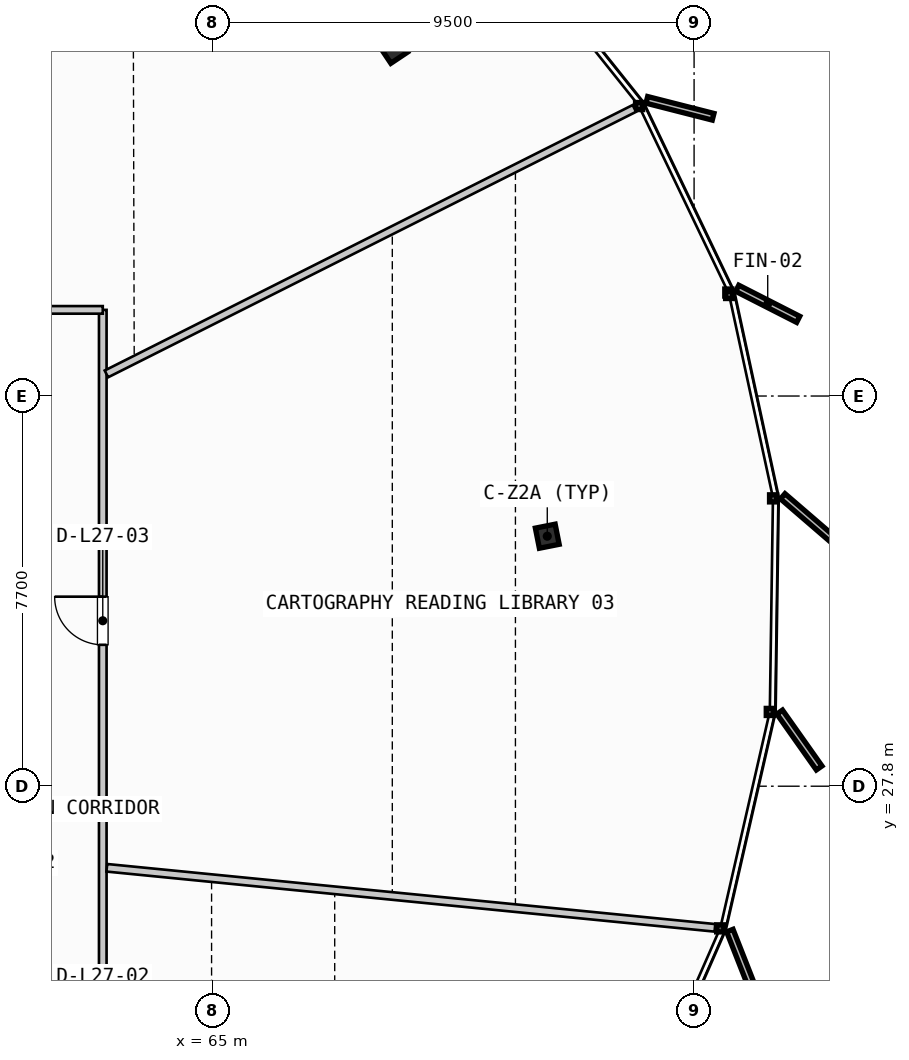
"""IFC4 building model, lengths in metres.
Left out: names, types, materials, properties, quantities, classifications, styles, units other than length and angle.
Written with IfcOpenShell. Run it as: python <this file> out.ifc"""

import sys

from ifc_helpers import new_model, si_unit, direction, frame, frame_2d, origin, origin_2d, place, context, subcontext, project, spatial, rectangle, i_section, extrude, source, transform, mapped, element, fill, save


model = new_model("IFC4")
c1 = context("Model", 3, precision=1e-05, world=origin(), true_north=direction((0.0, 1.0)))
c2 = subcontext(c1, "Body", "Model", "MODEL_VIEW")
j1 = project(units=[si_unit("LENGTHUNIT", "METRE"), si_unit("PLANEANGLEUNIT", "RADIAN")], contexts=[c1])
p1 = place(None, origin())
s1 = spatial("IfcSite", under=j1, at=p1, CompositionType="ELEMENT")
p2 = place(p1, origin())
s2 = spatial("IfcBuilding", under=s1, at=p2, CompositionType="ELEMENT")
p3 = place(p2, frame((0.0, 0.0, 110.8)))
s3 = spatial("IfcBuildingStorey", under=s2, at=p3, CompositionType="ELEMENT", Elevation=110.8)
m1 = source(origin(), c2, "Body", "SweptSolid", [
    extrude(i_section(OverallWidth=0.405, OverallDepth=0.398, WebThickness=0.035, FlangeThickness=0.056, FilletRadius=0.015, at=origin_2d()), origin(), (0.0, 0.0, 1.0), 3.35),
])
for number, where, z_axis, x_axis in (
    (1, (71.603, 32.733, 0.0), (0.0, 0.0, 1.0), (0.981, 0.195, 0.0)),
    (2, (68.569, 42.345, 0.0), (0.0, 0.0, 1.0), (0.831, 0.556, 0.0)),
):
    element("IfcColumn", number, at=place(p3, frame(where, z_axis=z_axis, x_axis=x_axis)), inside=s3, PredefinedType="COLUMN", context=c2, shape_type="MappedRepresentation", body=[
        mapped(m1, transform((0.0, 0.0, 0.0), scale=1.0)),
    ])
p4 = place(p3, frame((62.83, 17.98, 0.0), z_axis=(0.0, 0.0, 1.0), x_axis=(0.0, 1.0, 0.0)))
e3 = element("IfcWall", 3, at=p4, inside=s3, PredefinedType="PARTITIONING", context=c2, shape_type="SweptSolid", body=[
    extrude(rectangle(XDim=19.22, YDim=0.15, at=frame_2d((9.61, 0.0))), origin(), (0.0, 0.0, 1.0), 2.28),
])
p5 = place(p4, frame((3.924, 0.0, 0.0)))
e4 = element("IfcOpeningElement", 4, at=p5, cuts=e3, PredefinedType="OPENING", context=c2, shape_type="SweptSolid", body=[
    extrude(rectangle(XDim=0.95, YDim=2.15, at=frame_2d((0.475, 1.075))), frame((0.0, 0.085, 0.0), z_axis=(0.0, -1.0, 0.0), x_axis=(1.0, 0.0, 0.0)), (0.0, 0.0, 1.0), 0.17),
])
p6 = place(p4, frame((12.61, 0.0, 0.0)))
e5 = element("IfcOpeningElement", 5, at=p6, cuts=e3, PredefinedType="OPENING", context=c2, shape_type="SweptSolid", body=[
    extrude(rectangle(XDim=0.95, YDim=2.15, at=frame_2d((0.475, 1.075))), frame((0.0, 0.085, 0.0), z_axis=(0.0, -1.0, 0.0), x_axis=(1.0, 0.0, 0.0)), (0.0, 0.0, 1.0), 0.17),
])
p7 = place(p3, frame((62.83, 37.2, 0.0), z_axis=(0.0, 0.0, 1.0), x_axis=(-1.0, 0.0, 0.0)))
e6 = element("IfcWall", 6, at=p7, inside=s3, PredefinedType="PARTITIONING", context=c2, shape_type="SweptSolid", body=[
    extrude(rectangle(XDim=30.5, YDim=0.15, at=frame_2d((15.25, 0.0))), origin(), (0.0, 0.0, 1.0), 2.28),
])
p8 = place(p7, frame((5.396, 0.0, 0.0)))
e7 = element("IfcOpeningElement", 7, at=p8, cuts=e6, PredefinedType="OPENING", context=c2, shape_type="SweptSolid", body=[
    extrude(rectangle(XDim=0.95, YDim=2.15, at=frame_2d((0.475, 1.075))), frame((0.0, 0.085, 0.0), z_axis=(0.0, -1.0, 0.0), x_axis=(1.0, 0.0, 0.0)), (0.0, 0.0, 1.0), 0.17),
])
p9 = place(p7, frame((20.049, 0.0, 0.0)))
e8 = element("IfcOpeningElement", 8, at=p9, cuts=e6, PredefinedType="OPENING", context=c2, shape_type="SweptSolid", body=[
    extrude(rectangle(XDim=0.95, YDim=2.15, at=frame_2d((0.475, 1.075))), frame((0.0, 0.085, 0.0), z_axis=(0.0, -1.0, 0.0), x_axis=(1.0, 0.0, 0.0)), (0.0, 0.0, 1.0), 0.17),
])
p10 = place(p3, frame((62.91, 26.19, 0.0), z_axis=(0.0, 0.0, 1.0), x_axis=(0.995158113717, -0.098286971176, 0.0)))
e9 = element("IfcWall", 9, at=p10, inside=s3, PredefinedType="PARTITIONING", context=c2, shape_type="SweptSolid", body=[
    extrude(rectangle(XDim=12.06, YDim=0.15, at=frame_2d((6.03, 0.0))), origin(), (0.0, 0.0, 1.0), 2.28),
])
p11 = place(p3, frame((62.902, 35.936, 0.0), z_axis=(0.0, 0.0, 1.0), x_axis=(0.893411700763, 0.449238837302, 0.0)))
e10 = element("IfcWall", 10, at=p11, inside=s3, PredefinedType="PARTITIONING", context=c2, shape_type="SweptSolid", body=[
    extrude(rectangle(XDim=11.663, YDim=0.15, at=frame_2d((5.831, 0.0))), origin(), (0.0, 0.0, 1.0), 2.28),
])
m2 = source(origin(), c2, "Body", "SweptSolid", [
    extrude(rectangle(XDim=0.95, YDim=2.15, at=frame_2d((0.475, 1.075))), frame((0.0, 0.025, 0.0), z_axis=(0.0, -1.0, 0.0), x_axis=(1.0, 0.0, 0.0)), (0.0, 0.0, 1.0), 0.05),
])
p12 = place(p6, origin())
e11 = element("IfcDoor", 11, at=p12, inside=s3, OperationType="SINGLE_SWING_RIGHT", PredefinedType="DOOR", context=c2, shape_type="MappedRepresentation", body=[
    mapped(m2, transform((0.0, 0.0, 0.0), scale=1.0)),
])
fill(e5, e11)
save(model, sys.argv[1])
